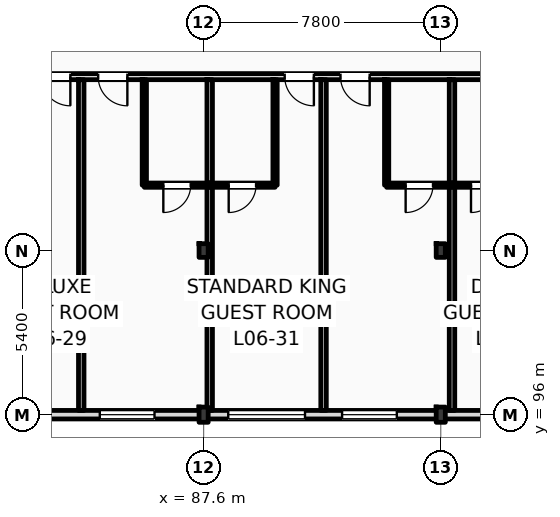
"""IFC4 building model, lengths in metres.
Left out: names, types, materials, properties, quantities, classifications, styles, units other than length and angle.
Written with IfcOpenShell. Run it as: python <this file> out.ifc"""

import sys

from ifc_helpers import new_model, si_unit, direction, frame, frame_2d, origin, origin_2d, place, context, subcontext, project, spatial, rectangle, i_section, extrude, element, fill, save


model = new_model("IFC4")
c1 = context("Model", 3, precision=1e-05, world=origin(), true_north=direction((0.0, 1.0)))
c2 = subcontext(c1, "Body", "Model", "MODEL_VIEW")
j1 = project(units=[si_unit("LENGTHUNIT", "METRE"), si_unit("PLANEANGLEUNIT", "RADIAN")], contexts=[c1])
p1 = place(None, origin())
s1 = spatial("IfcSite", under=j1, at=p1, CompositionType="ELEMENT")
p2 = place(p1, origin())
s2 = spatial("IfcBuilding", under=s1, at=p2, CompositionType="ELEMENT")
p3 = place(p2, frame((0.0, 0.0, 28.2)))
s3 = spatial("IfcBuildingStorey", under=s2, at=p3, CompositionType="ELEMENT", Elevation=28.2)
p4 = place(p3, frame((87.6, 96.0, 0.0), z_axis=(0.0, 0.0, 1.0), x_axis=(1.0, 0.0, 0.0)))
e1 = element("IfcColumn", 1, at=p4, inside=s3, PredefinedType="COLUMN", context=c2, shape_type="SweptSolid", body=[
    extrude(i_section(OverallWidth=0.3, OverallDepth=0.5, WebThickness=0.014, FlangeThickness=0.028, FilletRadius=0.027, at=origin_2d()), origin(), (0.0, 0.0, 1.0), 3.6),
])
p5 = place(p3, frame((87.6, 101.4, 0.0), z_axis=(0.0, 0.0, 1.0), x_axis=(1.0, 0.0, 0.0)))
e2 = element("IfcColumn", 2, at=p5, inside=s3, PredefinedType="COLUMN", context=c2, shape_type="SweptSolid", body=[
    extrude(i_section(OverallWidth=0.3, OverallDepth=0.45, WebThickness=0.014, FlangeThickness=0.026, FilletRadius=0.027, at=origin_2d()), origin(), (0.0, 0.0, 1.0), 3.6),
])
p6 = place(p3, frame((95.4, 96.0, 0.0), z_axis=(0.0, 0.0, 1.0), x_axis=(1.0, 0.0, 0.0)))
e3 = element("IfcColumn", 3, at=p6, inside=s3, PredefinedType="COLUMN", context=c2, shape_type="SweptSolid", body=[
    extrude(i_section(OverallWidth=0.3, OverallDepth=0.5, WebThickness=0.014, FlangeThickness=0.028, FilletRadius=0.027, at=origin_2d()), origin(), (0.0, 0.0, 1.0), 3.6),
])
p7 = place(p3, frame((95.4, 101.4, 0.0), z_axis=(0.0, 0.0, 1.0), x_axis=(1.0, 0.0, 0.0)))
e4 = element("IfcColumn", 4, at=p7, inside=s3, PredefinedType="COLUMN", context=c2, shape_type="SweptSolid", body=[
    extrude(i_section(OverallWidth=0.3, OverallDepth=0.45, WebThickness=0.014, FlangeThickness=0.026, FilletRadius=0.027, at=origin_2d()), origin(), (0.0, 0.0, 1.0), 3.6),
])
p8 = place(p3, frame((25.2, 96.0, 0.0), z_axis=(0.0, 0.0, 1.0), x_axis=(1.0, 0.0, 0.0)))
e5 = element("IfcWall", 5, at=p8, inside=s3, PredefinedType="STANDARD", context=c2, shape_type="SweptSolid", body=[
    extrude(rectangle(XDim=94.8, YDim=0.28, at=frame_2d((47.4, 0.0))), origin(), (0.0, 0.0, 1.0), 2.8),
])
p9 = place(p8, frame((16.454, 0.0, 0.9)))
e6 = element("IfcOpeningElement", 6, at=p9, cuts=e5, PredefinedType="OPENING", context=c2, shape_type="SweptSolid", body=[
    extrude(rectangle(XDim=2.7, YDim=1.72, at=frame_2d((1.35, 0.86))), frame((0.0, 0.15, 0.0), z_axis=(0.0, -1.0, 0.0), x_axis=(1.0, 0.0, 0.0)), (0.0, 0.0, 1.0), 0.3),
])
p10 = place(p8, frame((20.068, 0.0, 0.9)))
e7 = element("IfcOpeningElement", 7, at=p10, cuts=e5, PredefinedType="OPENING", context=c2, shape_type="SweptSolid", body=[
    extrude(rectangle(XDim=2.389, YDim=1.72, at=frame_2d((1.194, 0.86))), frame((0.0, 0.15, 0.0), z_axis=(0.0, -1.0, 0.0), x_axis=(1.0, 0.0, 0.0)), (0.0, 0.0, 1.0), 0.3),
])
p11 = place(p8, frame((24.277, 0.0, 0.9)))
e8 = element("IfcOpeningElement", 8, at=p11, cuts=e5, PredefinedType="OPENING", context=c2, shape_type="SweptSolid", body=[
    extrude(rectangle(XDim=1.8, YDim=1.72, at=frame_2d((0.9, 0.86))), frame((0.0, 0.15, 0.0), z_axis=(0.0, -1.0, 0.0), x_axis=(1.0, 0.0, 0.0)), (0.0, 0.0, 1.0), 0.3),
])
p12 = place(p8, frame((27.885, 0.0, 0.9)))
e9 = element("IfcOpeningElement", 9, at=p12, cuts=e5, PredefinedType="OPENING", context=c2, shape_type="SweptSolid", body=[
    extrude(rectangle(XDim=2.388, YDim=1.72, at=frame_2d((1.194, 0.86))), frame((0.0, 0.15, 0.0), z_axis=(0.0, -1.0, 0.0), x_axis=(1.0, 0.0, 0.0)), (0.0, 0.0, 1.0), 0.3),
])
p13 = place(p8, frame((32.093, 0.0, 0.9)))
e10 = element("IfcOpeningElement", 10, at=p13, cuts=e5, PredefinedType="OPENING", context=c2, shape_type="SweptSolid", body=[
    extrude(rectangle(XDim=1.8, YDim=1.72, at=frame_2d((0.9, 0.86))), frame((0.0, 0.15, 0.0), z_axis=(0.0, -1.0, 0.0), x_axis=(1.0, 0.0, 0.0)), (0.0, 0.0, 1.0), 0.3),
])
p14 = place(p8, frame((35.702, 0.0, 0.9)))
e11 = element("IfcOpeningElement", 11, at=p14, cuts=e5, PredefinedType="OPENING", context=c2, shape_type="SweptSolid", body=[
    extrude(rectangle(XDim=2.488, YDim=1.72, at=frame_2d((1.244, 0.86))), frame((0.0, 0.15, 0.0), z_axis=(0.0, -1.0, 0.0), x_axis=(1.0, 0.0, 0.0)), (0.0, 0.0, 1.0), 0.3),
])
p15 = place(p8, frame((55.56, 0.0, 0.9)))
e12 = element("IfcOpeningElement", 12, at=p15, cuts=e5, PredefinedType="OPENING", context=c2, shape_type="SweptSolid", body=[
    extrude(rectangle(XDim=1.8, YDim=1.72, at=frame_2d((0.9, 0.86))), frame((0.0, 0.15, 0.0), z_axis=(0.0, -1.0, 0.0), x_axis=(1.0, 0.0, 0.0)), (0.0, 0.0, 1.0), 0.3),
])
p16 = place(p8, frame((58.985, 0.0, 0.9)))
e13 = element("IfcOpeningElement", 13, at=p16, cuts=e5, PredefinedType="OPENING", context=c2, shape_type="SweptSolid", body=[
    extrude(rectangle(XDim=1.8, YDim=1.72, at=frame_2d((0.9, 0.86))), frame((0.0, 0.15, 0.0), z_axis=(0.0, -1.0, 0.0), x_axis=(1.0, 0.0, 0.0)), (0.0, 0.0, 1.0), 0.3),
])
p17 = place(p8, frame((63.21, 0.0, 0.9)))
e14 = element("IfcOpeningElement", 14, at=p17, cuts=e5, PredefinedType="OPENING", context=c2, shape_type="SweptSolid", body=[
    extrude(rectangle(XDim=2.525, YDim=1.72, at=frame_2d((1.262, 0.86))), frame((0.0, 0.15, 0.0), z_axis=(0.0, -1.0, 0.0), x_axis=(1.0, 0.0, 0.0)), (0.0, 0.0, 1.0), 0.3),
])
p18 = place(p8, frame((66.955, 0.0, 0.9)))
e15 = element("IfcOpeningElement", 15, at=p18, cuts=e5, PredefinedType="OPENING", context=c2, shape_type="SweptSolid", body=[
    extrude(rectangle(XDim=1.8, YDim=1.72, at=frame_2d((0.9, 0.86))), frame((0.0, 0.15, 0.0), z_axis=(0.0, -1.0, 0.0), x_axis=(1.0, 0.0, 0.0)), (0.0, 0.0, 1.0), 0.3),
])
p19 = place(p8, frame((71.892, 0.0, 0.9)))
e16 = element("IfcOpeningElement", 16, at=p19, cuts=e5, PredefinedType="OPENING", context=c2, shape_type="SweptSolid", body=[
    extrude(rectangle(XDim=1.1, YDim=1.5, at=frame_2d((0.55, 0.75))), frame((0.0, 0.15, 0.0), z_axis=(0.0, -1.0, 0.0), x_axis=(1.0, 0.0, 0.0)), (0.0, 0.0, 1.0), 0.3),
])
p20 = place(p8, frame((75.802, 0.0, 0.9)))
e17 = element("IfcOpeningElement", 17, at=p20, cuts=e5, PredefinedType="OPENING", context=c2, shape_type="SweptSolid", body=[
    extrude(rectangle(XDim=1.25, YDim=1.6, at=frame_2d((0.625, 0.8))), frame((0.0, 0.15, 0.0), z_axis=(0.0, -1.0, 0.0), x_axis=(1.0, 0.0, 0.0)), (0.0, 0.0, 1.0), 0.3),
])
p21 = place(p8, frame((79.712, 0.0, 0.9)))
e18 = element("IfcOpeningElement", 18, at=p21, cuts=e5, PredefinedType="OPENING", context=c2, shape_type="SweptSolid", body=[
    extrude(rectangle(XDim=1.4, YDim=1.7, at=frame_2d((0.7, 0.85))), frame((0.0, 0.15, 0.0), z_axis=(0.0, -1.0, 0.0), x_axis=(1.0, 0.0, 0.0)), (0.0, 0.0, 1.0), 0.3),
])
p22 = place(p8, frame((83.597, 0.0, 0.9)))
e19 = element("IfcOpeningElement", 19, at=p22, cuts=e5, PredefinedType="OPENING", context=c2, shape_type="SweptSolid", body=[
    extrude(rectangle(XDim=1.6, YDim=1.72, at=frame_2d((0.8, 0.86))), frame((0.0, 0.15, 0.0), z_axis=(0.0, -1.0, 0.0), x_axis=(1.0, 0.0, 0.0)), (0.0, 0.0, 1.0), 0.3),
])
p23 = place(p8, frame((87.507, 0.0, 0.9)))
e20 = element("IfcOpeningElement", 20, at=p23, cuts=e5, PredefinedType="OPENING", context=c2, shape_type="SweptSolid", body=[
    extrude(rectangle(XDim=1.75, YDim=1.72, at=frame_2d((0.875, 0.86))), frame((0.0, 0.15, 0.0), z_axis=(0.0, -1.0, 0.0), x_axis=(1.0, 0.0, 0.0)), (0.0, 0.0, 1.0), 0.3),
])
p24 = place(p8, frame((91.328, 0.0, 0.9)))
e21 = element("IfcOpeningElement", 21, at=p24, cuts=e5, PredefinedType="OPENING", context=c2, shape_type="SweptSolid", body=[
    extrude(rectangle(XDim=2.0, YDim=1.72, at=frame_2d((1.0, 0.86))), frame((0.0, 0.15, 0.0), z_axis=(0.0, -1.0, 0.0), x_axis=(1.0, 0.0, 0.0)), (0.0, 0.0, 1.0), 0.3),
])
p25 = place(p3, frame((79.76, 107.12, 0.0), z_axis=(0.0, 0.0, 1.0), x_axis=(1.0, 0.0, 0.0)))
e22 = element("IfcWall", 22, at=p25, inside=s3, PredefinedType="PARTITIONING", context=c2, shape_type="SweptSolid", body=[
    extrude(rectangle(XDim=40.1, YDim=0.2, at=frame_2d((20.05, 0.0))), origin(), (0.0, 0.0, 1.0), 3.36),
])
p26 = place(p25, frame((2.497, 0.0, 0.0)))
e23 = element("IfcOpeningElement", 23, at=p26, cuts=e22, PredefinedType="OPENING", context=c2, shape_type="SweptSolid", body=[
    extrude(rectangle(XDim=0.96, YDim=2.2, at=frame_2d((0.48, 1.1))), frame((0.0, 0.11, 0.0), z_axis=(0.0, -1.0, 0.0), x_axis=(1.0, 0.0, 0.0)), (0.0, 0.0, 1.0), 0.22),
])
p27 = place(p25, frame((4.372, 0.0, 0.0)))
e24 = element("IfcOpeningElement", 24, at=p27, cuts=e22, PredefinedType="OPENING", context=c2, shape_type="SweptSolid", body=[
    extrude(rectangle(XDim=0.96, YDim=2.2, at=frame_2d((0.48, 1.1))), frame((0.0, 0.11, 0.0), z_axis=(0.0, -1.0, 0.0), x_axis=(1.0, 0.0, 0.0)), (0.0, 0.0, 1.0), 0.22),
])
p28 = place(p25, frame((10.507, 0.0, 0.0)))
e25 = element("IfcOpeningElement", 25, at=p28, cuts=e22, PredefinedType="OPENING", context=c2, shape_type="SweptSolid", body=[
    extrude(rectangle(XDim=0.96, YDim=2.2, at=frame_2d((0.48, 1.1))), frame((0.0, 0.11, 0.0), z_axis=(0.0, -1.0, 0.0), x_axis=(1.0, 0.0, 0.0)), (0.0, 0.0, 1.0), 0.22),
])
p29 = place(p25, frame((12.342, 0.0, 0.0)))
e26 = element("IfcOpeningElement", 26, at=p29, cuts=e22, PredefinedType="OPENING", context=c2, shape_type="SweptSolid", body=[
    extrude(rectangle(XDim=0.96, YDim=2.2, at=frame_2d((0.48, 1.1))), frame((0.0, 0.11, 0.0), z_axis=(0.0, -1.0, 0.0), x_axis=(1.0, 0.0, 0.0)), (0.0, 0.0, 1.0), 0.22),
])
p30 = place(p25, frame((18.477, 0.0, 0.0)))
e27 = element("IfcOpeningElement", 27, at=p30, cuts=e22, PredefinedType="OPENING", context=c2, shape_type="SweptSolid", body=[
    extrude(rectangle(XDim=0.96, YDim=2.2, at=frame_2d((0.48, 1.1))), frame((0.0, 0.11, 0.0), z_axis=(0.0, -1.0, 0.0), x_axis=(1.0, 0.0, 0.0)), (0.0, 0.0, 1.0), 0.22),
])
p31 = place(p25, frame((20.312, 0.0, 0.0)))
e28 = element("IfcOpeningElement", 28, at=p31, cuts=e22, PredefinedType="OPENING", context=c2, shape_type="SweptSolid", body=[
    extrude(rectangle(XDim=0.96, YDim=2.2, at=frame_2d((0.48, 1.1))), frame((0.0, 0.11, 0.0), z_axis=(0.0, -1.0, 0.0), x_axis=(1.0, 0.0, 0.0)), (0.0, 0.0, 1.0), 0.22),
])
p32 = place(p25, frame((26.447, 0.0, 0.0)))
e29 = element("IfcOpeningElement", 29, at=p32, cuts=e22, PredefinedType="OPENING", context=c2, shape_type="SweptSolid", body=[
    extrude(rectangle(XDim=0.96, YDim=2.2, at=frame_2d((0.48, 1.1))), frame((0.0, 0.11, 0.0), z_axis=(0.0, -1.0, 0.0), x_axis=(1.0, 0.0, 0.0)), (0.0, 0.0, 1.0), 0.22),
])
p33 = place(p25, frame((28.282, 0.0, 0.0)))
e30 = element("IfcOpeningElement", 30, at=p33, cuts=e22, PredefinedType="OPENING", context=c2, shape_type="SweptSolid", body=[
    extrude(rectangle(XDim=0.96, YDim=2.2, at=frame_2d((0.48, 1.1))), frame((0.0, 0.11, 0.0), z_axis=(0.0, -1.0, 0.0), x_axis=(1.0, 0.0, 0.0)), (0.0, 0.0, 1.0), 0.22),
])
p34 = place(p25, frame((34.417, 0.0, 0.0)))
e31 = element("IfcOpeningElement", 31, at=p34, cuts=e22, PredefinedType="OPENING", context=c2, shape_type="SweptSolid", body=[
    extrude(rectangle(XDim=0.96, YDim=2.2, at=frame_2d((0.48, 1.1))), frame((0.0, 0.11, 0.0), z_axis=(0.0, -1.0, 0.0), x_axis=(1.0, 0.0, 0.0)), (0.0, 0.0, 1.0), 0.22),
])
p35 = place(p25, frame((36.212, 0.0, 0.0)))
e32 = element("IfcOpeningElement", 32, at=p35, cuts=e22, PredefinedType="OPENING", context=c2, shape_type="SweptSolid", body=[
    extrude(rectangle(XDim=0.96, YDim=2.2, at=frame_2d((0.48, 1.1))), frame((0.0, 0.11, 0.0), z_axis=(0.0, -1.0, 0.0), x_axis=(1.0, 0.0, 0.0)), (0.0, 0.0, 1.0), 0.22),
])
p36 = place(p3, frame((83.575, 96.14, 0.0), z_axis=(0.0, 0.0, 1.0), x_axis=(0.0, 1.0, 0.0)))
e33 = element("IfcWall", 33, at=p36, inside=s3, PredefinedType="PARTITIONING", context=c2, shape_type="SweptSolid", body=[
    extrude(rectangle(XDim=10.88, YDim=0.18, at=frame_2d((5.44, 0.0))), origin(), (0.0, 0.0, 1.0), 3.36),
])
p37 = place(p3, frame((87.8, 96.14, 0.0), z_axis=(0.0, 0.0, 1.0), x_axis=(0.0, 1.0, 0.0)))
e34 = element("IfcWall", 34, at=p37, inside=s3, PredefinedType="PARTITIONING", context=c2, shape_type="SweptSolid", body=[
    extrude(rectangle(XDim=10.88, YDim=0.18, at=frame_2d((5.44, 0.0))), origin(), (0.0, 0.0, 1.0), 2.99),
])
p38 = place(p3, frame((85.65, 103.55, 0.0), z_axis=(0.0, 0.0, 1.0), x_axis=(0.0, 1.0, 0.0)))
e35 = element("IfcWall", 35, at=p38, inside=s3, PredefinedType="PARTITIONING", context=c2, shape_type="SweptSolid", body=[
    extrude(rectangle(XDim=3.47, YDim=0.14, at=frame_2d((1.735, 0.0))), origin(), (0.0, 0.0, 1.0), 3.36),
])
p39 = place(p3, frame((85.65, 103.55, 0.0), z_axis=(0.0, 0.0, 1.0), x_axis=(1.0, 0.0, 0.0)))
e36 = element("IfcWall", 36, at=p39, inside=s3, PredefinedType="PARTITIONING", context=c2, shape_type="SweptSolid", body=[
    extrude(rectangle(XDim=2.15, YDim=0.14, at=frame_2d((1.075, 0.0))), origin(), (0.0, 0.0, 1.0), 3.36),
])
p40 = place(p39, frame((0.625, 0.0, 0.0)))
e37 = element("IfcOpeningElement", 37, at=p40, cuts=e36, PredefinedType="OPENING", context=c2, shape_type="SweptSolid", body=[
    extrude(rectangle(XDim=0.9, YDim=2.1, at=frame_2d((0.45, 1.05))), frame((0.0, 0.08, 0.0), z_axis=(0.0, -1.0, 0.0), x_axis=(1.0, 0.0, 0.0)), (0.0, 0.0, 1.0), 0.16),
])
p41 = place(p3, frame((91.545, 96.14, 0.0), z_axis=(0.0, 0.0, 1.0), x_axis=(0.0, 1.0, 0.0)))
e38 = element("IfcWall", 38, at=p41, inside=s3, PredefinedType="PARTITIONING", context=c2, shape_type="SweptSolid", body=[
    extrude(rectangle(XDim=10.88, YDim=0.18, at=frame_2d((5.44, 0.0))), origin(), (0.0, 0.0, 1.0), 3.36),
])
p42 = place(p3, frame((89.95, 103.55, 0.0), z_axis=(0.0, 0.0, 1.0), x_axis=(0.0, 1.0, 0.0)))
e39 = element("IfcWall", 39, at=p42, inside=s3, PredefinedType="PARTITIONING", context=c2, shape_type="SweptSolid", body=[
    extrude(rectangle(XDim=3.47, YDim=0.14, at=frame_2d((1.735, 0.0))), origin(), (0.0, 0.0, 1.0), 3.36),
])
p43 = place(p3, frame((87.8, 103.55, 0.0), z_axis=(0.0, 0.0, 1.0), x_axis=(1.0, 0.0, 0.0)))
e40 = element("IfcWall", 40, at=p43, inside=s3, PredefinedType="PARTITIONING", context=c2, shape_type="SweptSolid", body=[
    extrude(rectangle(XDim=2.15, YDim=0.14, at=frame_2d((1.075, 0.0))), origin(), (0.0, 0.0, 1.0), 3.36),
])
p44 = place(p43, frame((0.625, 0.0, 0.0)))
e41 = element("IfcOpeningElement", 41, at=p44, cuts=e40, PredefinedType="OPENING", context=c2, shape_type="SweptSolid", body=[
    extrude(rectangle(XDim=0.9, YDim=2.1, at=frame_2d((0.45, 1.05))), frame((0.0, 0.08, 0.0), z_axis=(0.0, -1.0, 0.0), x_axis=(1.0, 0.0, 0.0)), (0.0, 0.0, 1.0), 0.16),
])
p45 = place(p3, frame((95.77, 96.14, 0.0), z_axis=(0.0, 0.0, 1.0), x_axis=(0.0, 1.0, 0.0)))
e42 = element("IfcWall", 42, at=p45, inside=s3, PredefinedType="PARTITIONING", context=c2, shape_type="SweptSolid", body=[
    extrude(rectangle(XDim=10.88, YDim=0.18, at=frame_2d((5.44, 0.0))), origin(), (0.0, 0.0, 1.0), 3.36),
])
p46 = place(p3, frame((93.62, 103.55, 0.0), z_axis=(0.0, 0.0, 1.0), x_axis=(0.0, 1.0, 0.0)))
e43 = element("IfcWall", 43, at=p46, inside=s3, PredefinedType="PARTITIONING", context=c2, shape_type="SweptSolid", body=[
    extrude(rectangle(XDim=3.47, YDim=0.14, at=frame_2d((1.735, 0.0))), origin(), (0.0, 0.0, 1.0), 3.36),
])
p47 = place(p3, frame((93.62, 103.55, 0.0), z_axis=(0.0, 0.0, 1.0), x_axis=(1.0, 0.0, 0.0)))
e44 = element("IfcWall", 44, at=p47, inside=s3, PredefinedType="PARTITIONING", context=c2, shape_type="SweptSolid", body=[
    extrude(rectangle(XDim=2.15, YDim=0.14, at=frame_2d((1.075, 0.0))), origin(), (0.0, 0.0, 1.0), 3.36),
])
p48 = place(p47, frame((0.625, 0.0, 0.0)))
e45 = element("IfcOpeningElement", 45, at=p48, cuts=e44, PredefinedType="OPENING", context=c2, shape_type="SweptSolid", body=[
    extrude(rectangle(XDim=0.9, YDim=2.1, at=frame_2d((0.45, 1.05))), frame((0.0, 0.08, 0.0), z_axis=(0.0, -1.0, 0.0), x_axis=(1.0, 0.0, 0.0)), (0.0, 0.0, 1.0), 0.16),
])
p49 = place(p3, frame((95.77, 103.55, 0.0), z_axis=(0.0, 0.0, 1.0), x_axis=(1.0, 0.0, 0.0)))
e46 = element("IfcWall", 46, at=p49, inside=s3, PredefinedType="PARTITIONING", context=c2, shape_type="SweptSolid", body=[
    extrude(rectangle(XDim=2.15, YDim=0.14, at=frame_2d((1.075, 0.0))), origin(), (0.0, 0.0, 1.0), 3.36),
])
p50 = place(p49, frame((0.625, 0.0, 0.0)))
e47 = element("IfcOpeningElement", 47, at=p50, cuts=e46, PredefinedType="OPENING", context=c2, shape_type="SweptSolid", body=[
    extrude(rectangle(XDim=0.9, YDim=2.1, at=frame_2d((0.45, 1.05))), frame((0.0, 0.08, 0.0), z_axis=(0.0, -1.0, 0.0), x_axis=(1.0, 0.0, 0.0)), (0.0, 0.0, 1.0), 0.16),
])
p51 = place(p16, origin())
e48 = element("IfcWindow", 48, at=p51, inside=s3, PartitioningType="DOUBLE_PANEL_VERTICAL", PredefinedType="WINDOW", context=c2, shape_type="SweptSolid", body=[
    extrude(rectangle(XDim=1.8, YDim=1.72, at=frame_2d((0.9, 0.86))), frame((0.0, 0.03, 0.0), z_axis=(0.0, -1.0, 0.0), x_axis=(1.0, 0.0, 0.0)), (0.0, 0.0, 1.0), 0.06),
])
fill(e13, e48)
p52 = place(p17, origin())
e49 = element("IfcWindow", 49, at=p52, inside=s3, PartitioningType="DOUBLE_PANEL_VERTICAL", PredefinedType="WINDOW", context=c2, shape_type="SweptSolid", body=[
    extrude(rectangle(XDim=2.525, YDim=1.72, at=frame_2d((1.262, 0.86))), frame((0.0, 0.03, 0.0), z_axis=(0.0, -1.0, 0.0), x_axis=(1.0, 0.0, 0.0)), (0.0, 0.0, 1.0), 0.06),
])
fill(e14, e49)
p53 = place(p18, origin())
e50 = element("IfcWindow", 50, at=p53, inside=s3, PartitioningType="DOUBLE_PANEL_VERTICAL", PredefinedType="WINDOW", context=c2, shape_type="SweptSolid", body=[
    extrude(rectangle(XDim=1.8, YDim=1.72, at=frame_2d((0.9, 0.86))), frame((0.0, 0.03, 0.0), z_axis=(0.0, -1.0, 0.0), x_axis=(1.0, 0.0, 0.0)), (0.0, 0.0, 1.0), 0.06),
])
fill(e15, e50)
p54 = place(p26, frame((0.96, 0.0, 0.0), z_axis=(0.0, 0.0, 1.0), x_axis=(-1.0, 0.0, 0.0)))
e51 = element("IfcDoor", 51, at=p54, inside=s3, OperationType="SINGLE_SWING_RIGHT", PredefinedType="DOOR", context=c2, shape_type="SweptSolid", body=[
    extrude(rectangle(XDim=0.96, YDim=2.2, at=frame_2d((0.48, 1.1))), frame((0.0, 0.025, 0.0), z_axis=(0.0, -1.0, 0.0), x_axis=(1.0, 0.0, 0.0)), (0.0, 0.0, 1.0), 0.05),
])
fill(e23, e51)
p55 = place(p27, frame((0.96, 0.0, 0.0), z_axis=(0.0, 0.0, 1.0), x_axis=(-1.0, 0.0, 0.0)))
e52 = element("IfcDoor", 52, at=p55, inside=s3, OperationType="SINGLE_SWING_RIGHT", PredefinedType="DOOR", context=c2, shape_type="SweptSolid", body=[
    extrude(rectangle(XDim=0.96, YDim=2.2, at=frame_2d((0.48, 1.1))), frame((0.0, 0.025, 0.0), z_axis=(0.0, -1.0, 0.0), x_axis=(1.0, 0.0, 0.0)), (0.0, 0.0, 1.0), 0.05),
])
fill(e24, e52)
p56 = place(p40, frame((0.9, 0.0, 0.0), z_axis=(0.0, 0.0, 1.0), x_axis=(-1.0, 0.0, 0.0)))
e53 = element("IfcDoor", 53, at=p56, inside=s3, OperationType="SINGLE_SWING_LEFT", PredefinedType="DOOR", context=c2, shape_type="SweptSolid", body=[
    extrude(rectangle(XDim=0.9, YDim=2.1, at=frame_2d((0.45, 1.05))), frame((0.0, 0.025, 0.0), z_axis=(0.0, -1.0, 0.0), x_axis=(1.0, 0.0, 0.0)), (0.0, 0.0, 1.0), 0.05),
])
fill(e37, e53)
p57 = place(p28, frame((0.96, 0.0, 0.0), z_axis=(0.0, 0.0, 1.0), x_axis=(-1.0, 0.0, 0.0)))
e54 = element("IfcDoor", 54, at=p57, inside=s3, OperationType="SINGLE_SWING_RIGHT", PredefinedType="DOOR", context=c2, shape_type="SweptSolid", body=[
    extrude(rectangle(XDim=0.96, YDim=2.2, at=frame_2d((0.48, 1.1))), frame((0.0, 0.025, 0.0), z_axis=(0.0, -1.0, 0.0), x_axis=(1.0, 0.0, 0.0)), (0.0, 0.0, 1.0), 0.05),
])
fill(e25, e54)
p58 = place(p44, frame((0.9, 0.0, 0.0), z_axis=(0.0, 0.0, 1.0), x_axis=(-1.0, 0.0, 0.0)))
e55 = element("IfcDoor", 55, at=p58, inside=s3, OperationType="SINGLE_SWING_LEFT", PredefinedType="DOOR", context=c2, shape_type="SweptSolid", body=[
    extrude(rectangle(XDim=0.9, YDim=2.1, at=frame_2d((0.45, 1.05))), frame((0.0, 0.025, 0.0), z_axis=(0.0, -1.0, 0.0), x_axis=(1.0, 0.0, 0.0)), (0.0, 0.0, 1.0), 0.05),
])
fill(e41, e55)
p59 = place(p29, frame((0.96, 0.0, 0.0), z_axis=(0.0, 0.0, 1.0), x_axis=(-1.0, 0.0, 0.0)))
e56 = element("IfcDoor", 56, at=p59, inside=s3, OperationType="SINGLE_SWING_RIGHT", PredefinedType="DOOR", context=c2, shape_type="SweptSolid", body=[
    extrude(rectangle(XDim=0.96, YDim=2.2, at=frame_2d((0.48, 1.1))), frame((0.0, 0.025, 0.0), z_axis=(0.0, -1.0, 0.0), x_axis=(1.0, 0.0, 0.0)), (0.0, 0.0, 1.0), 0.05),
])
fill(e26, e56)
p60 = place(p48, frame((0.9, 0.0, 0.0), z_axis=(0.0, 0.0, 1.0), x_axis=(-1.0, 0.0, 0.0)))
e57 = element("IfcDoor", 57, at=p60, inside=s3, OperationType="SINGLE_SWING_LEFT", PredefinedType="DOOR", context=c2, shape_type="SweptSolid", body=[
    extrude(rectangle(XDim=0.9, YDim=2.1, at=frame_2d((0.45, 1.05))), frame((0.0, 0.025, 0.0), z_axis=(0.0, -1.0, 0.0), x_axis=(1.0, 0.0, 0.0)), (0.0, 0.0, 1.0), 0.05),
])
fill(e45, e57)
p61 = place(p50, frame((0.9, 0.0, 0.0), z_axis=(0.0, 0.0, 1.0), x_axis=(-1.0, 0.0, 0.0)))
e58 = element("IfcDoor", 58, at=p61, inside=s3, OperationType="SINGLE_SWING_LEFT", PredefinedType="DOOR", context=c2, shape_type="SweptSolid", body=[
    extrude(rectangle(XDim=0.9, YDim=2.1, at=frame_2d((0.45, 1.05))), frame((0.0, 0.025, 0.0), z_axis=(0.0, -1.0, 0.0), x_axis=(1.0, 0.0, 0.0)), (0.0, 0.0, 1.0), 0.05),
])
fill(e47, e58)
save(model, sys.argv[1])
